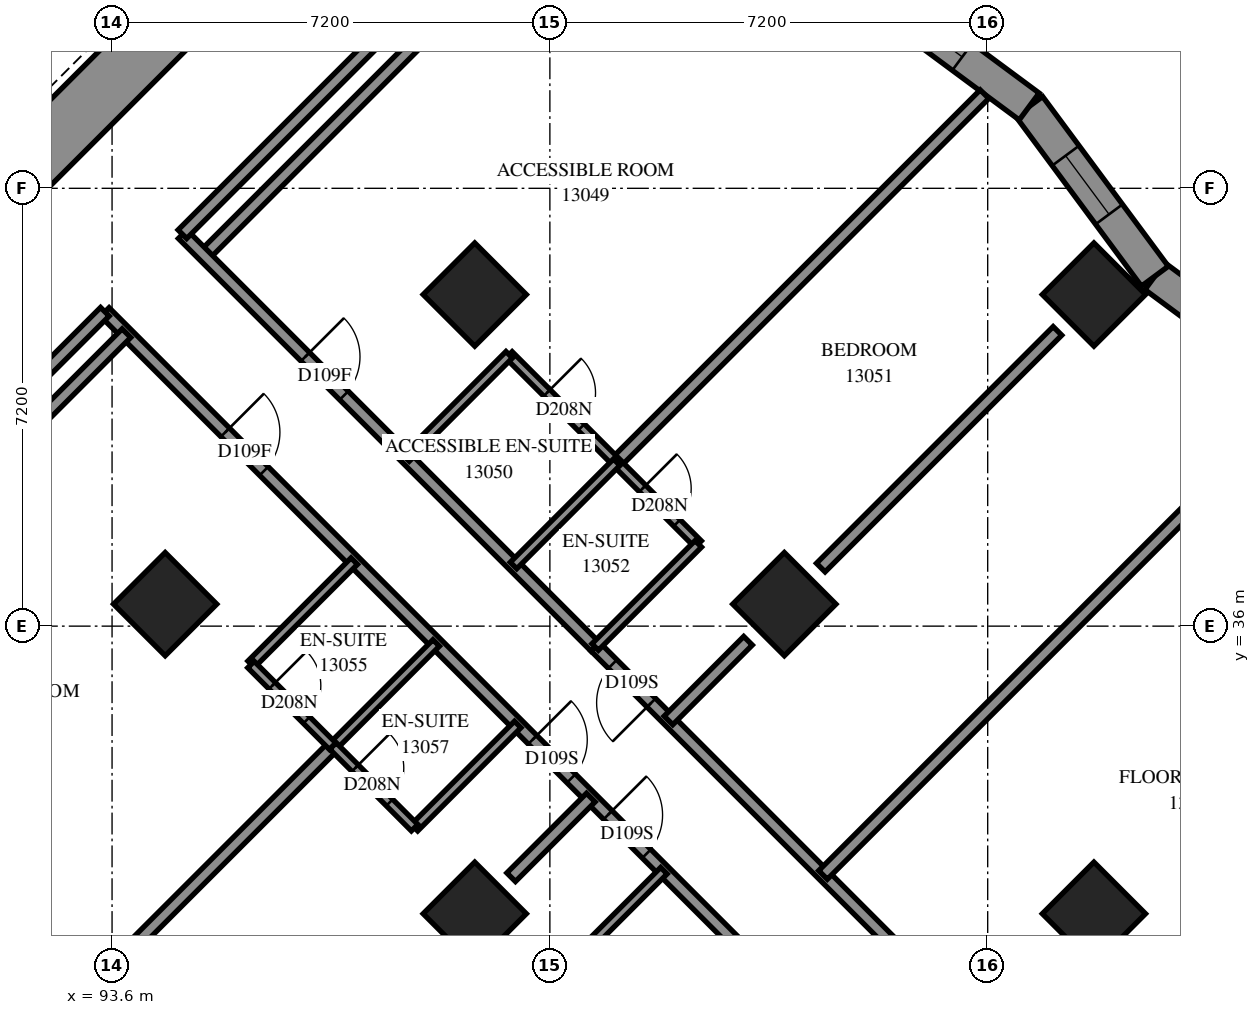
"""IFC4 building model, lengths in metres.
Left out: names, types, materials, properties, quantities, classifications, styles, units other than length and angle.
Written with IfcOpenShell. Run it as: python <this file> out.ifc"""

import sys

from ifc_helpers import new_model, si_unit, direction, frame, frame_2d, origin, origin_2d, place, context, subcontext, project, spatial, polyline, rectangle, outline, extrude, element, fill, save


model = new_model("IFC4")
c1 = context("Model", 3, precision=1e-05, world=origin(), true_north=direction((0.0, 1.0)))
c2 = subcontext(c1, "Body", "Model", "MODEL_VIEW")
j1 = project(units=[si_unit("LENGTHUNIT", "METRE"), si_unit("PLANEANGLEUNIT", "RADIAN")], contexts=[c1])
p1 = place(None, origin())
s1 = spatial("IfcSite", under=j1, at=p1, CompositionType="ELEMENT")
p2 = place(p1, origin())
s2 = spatial("IfcBuilding", under=s1, at=p2, CompositionType="ELEMENT")
p3 = place(p2, frame((0.0, 0.0, 50.8)))
s3 = spatial("IfcBuildingStorey", under=s2, at=p3, CompositionType="ELEMENT", Elevation=50.8)
for number, where, z_axis, x_axis in (
    (1, (99.565, 41.453, 0.0), (0.0, 0.0, 1.0), (0.707, -0.707, 0.0)),
    (2, (94.474, 36.362, 0.0), (0.0, 0.0, 1.0), (0.707, -0.707, 0.0)),
    (3, (109.747, 41.453, 0.0), (0.0, 0.0, 1.0), (0.707, -0.707, 0.0)),
    (4, (104.656, 36.362, 0.0), (0.0, 0.0, 1.0), (0.707, -0.707, 0.0)),
    (5, (99.565, 31.271, 0.0), (0.0, 0.0, 1.0), (0.707, -0.707, 0.0)),
    (6, (109.747, 31.271, 0.0), (0.0, 0.0, 1.0), (0.707, -0.707, 0.0)),
):
    element("IfcColumn", number, at=place(p3, frame(where, z_axis=z_axis, x_axis=x_axis)), inside=s3, PredefinedType="COLUMN", context=c2, shape_type="SweptSolid", body=[
        extrude(rectangle(XDim=1.2, YDim=1.2, at=origin_2d()), origin(), (0.0, 0.0, 1.0), 3.1),
    ])
p4 = place(p3, frame((87.19, 38.554, -0.3), z_axis=(0.0, 0.0, 1.0), x_axis=(0.707103309, 0.7071102534, 0.0)))
e7 = element("IfcWall", 7, at=p4, inside=s3, PredefinedType="SHEAR", context=c2, shape_type="SweptSolid", body=[
    extrude(rectangle(XDim=14.4, YDim=1.0, at=frame_2d((7.2, 0.0))), origin(), (0.0, 0.0, 1.0), 2.7),
])
p5 = place(p4, frame((4.55, 0.0, 0.3)))
e8 = element("IfcOpeningElement", 8, at=p5, cuts=e7, PredefinedType="OPENING", context=c2, shape_type="SweptSolid", body=[
    extrude(rectangle(XDim=1.1, YDim=2.1, at=frame_2d((0.55, 1.05))), frame((0.0, 0.51, 0.0), z_axis=(0.0, -1.0, 0.0), x_axis=(1.0, 0.0, 0.0)), (0.0, 0.0, 1.0), 1.02),
])
p6 = place(p4, frame((11.35, 0.0, 0.3)))
e9 = element("IfcOpeningElement", 9, at=p6, cuts=e7, PredefinedType="OPENING", context=c2, shape_type="SweptSolid", body=[
    extrude(rectangle(XDim=1.1, YDim=2.1, at=frame_2d((0.55, 1.05))), frame((0.0, 0.51, 0.0), z_axis=(0.0, -1.0, 0.0), x_axis=(1.0, 0.0, 0.0)), (0.0, 0.0, 1.0), 1.02),
])
p7 = place(p3, frame((113.54, 39.688, 0.0), z_axis=(0.0, 0.0, 1.0), x_axis=(-0.8036342136, 0.5951235593, 0.0)))
e10 = element("IfcWall", 10, at=p7, inside=s3, PredefinedType="SOLIDWALL", context=c2, shape_type="SweptSolid", body=[
    extrude(outline(polyline([(-0.041, -0.275), (3.432, -0.275), (3.514, 0.275), (0.041, 0.275), (-0.041, -0.275)])), origin(), (0.0, 0.0, 1.0), 3.1),
])
p8 = place(p7, frame((1.157, 0.0, 0.5)))
e11 = element("IfcOpeningElement", 11, at=p8, cuts=e10, PredefinedType="OPENING", context=c2, shape_type="SweptSolid", body=[
    extrude(rectangle(XDim=1.2, YDim=2.45, at=frame_2d((0.6, 1.225))), frame((0.0, 0.285, 0.0), z_axis=(0.0, -1.0, 0.0), x_axis=(1.0, 0.0, 0.0)), (0.0, 0.0, 1.0), 0.57),
])
p9 = place(p3, frame((110.749, 41.755, 0.0), z_axis=(0.0, 0.0, 1.0), x_axis=(-0.5951283843, 0.8036306404, 0.0)))
e12 = element("IfcWall", 12, at=p9, inside=s3, PredefinedType="SOLIDWALL", context=c2, shape_type="SweptSolid", body=[
    extrude(outline(polyline([(0.041, -0.275), (3.514, -0.275), (3.432, 0.275), (-0.041, 0.275), (0.041, -0.275)])), origin(), (0.0, 0.0, 1.0), 3.1),
])
p10 = place(p9, frame((1.266, 0.0, 0.5)))
e13 = element("IfcOpeningElement", 13, at=p10, cuts=e12, PredefinedType="OPENING", context=c2, shape_type="SweptSolid", body=[
    extrude(rectangle(XDim=1.2, YDim=2.45, at=frame_2d((0.6, 1.225))), frame((0.0, 0.285, 0.0), z_axis=(0.0, -1.0, 0.0), x_axis=(1.0, 0.0, 0.0)), (0.0, 0.0, 1.0), 0.57),
])
p11 = place(p3, frame((108.683, 44.545, 0.0), z_axis=(0.0, 0.0, 1.0), x_axis=(-0.8036342136, 0.5951235593, 0.0)))
e14 = element("IfcWall", 14, at=p11, inside=s3, PredefinedType="SOLIDWALL", context=c2, shape_type="SweptSolid", body=[
    extrude(outline(polyline([(-0.041, -0.275), (3.432, -0.275), (3.514, 0.275), (0.041, 0.275), (-0.041, -0.275)])), origin(), (0.0, 0.0, 1.0), 3.1),
])
p12 = place(p11, frame((1.37, 0.0, 0.5)))
e15 = element("IfcOpeningElement", 15, at=p12, cuts=e14, PredefinedType="OPENING", context=c2, shape_type="SweptSolid", body=[
    extrude(rectangle(XDim=1.2, YDim=2.45, at=frame_2d((0.6, 1.225))), frame((0.0, 0.285, 0.0), z_axis=(0.0, -1.0, 0.0), x_axis=(1.0, 0.0, 0.0)), (0.0, 0.0, 1.0), 0.57),
])
p13 = place(p3, frame((93.481, 41.167, 0.0), z_axis=(0.0, 0.0, 1.0), x_axis=(0.7071067812, -0.7071067812, 0.0)))
e16 = element("IfcWall", 16, at=p13, inside=s3, PredefinedType="PARTITIONING", context=c2, shape_type="SweptSolid", body=[
    extrude(rectangle(XDim=25.699, YDim=0.2, at=frame_2d((12.85, 0.0))), origin(), (0.0, 0.0, 1.0), 3.1),
])
p14 = place(p13, frame((2.8, 0.0, 0.0)))
e17 = element("IfcOpeningElement", 17, at=p14, cuts=e16, PredefinedType="OPENING", context=c2, shape_type="SweptSolid", body=[
    extrude(rectangle(XDim=0.9, YDim=2.1, at=frame_2d((0.45, 1.05))), frame((0.0, 0.11, 0.0), z_axis=(0.0, -1.0, 0.0), x_axis=(1.0, 0.0, 0.0)), (0.0, 0.0, 1.0), 0.22),
])
p15 = place(p13, frame((9.948, 0.0, 0.0)))
e18 = element("IfcOpeningElement", 18, at=p15, cuts=e16, PredefinedType="OPENING", context=c2, shape_type="SweptSolid", body=[
    extrude(rectangle(XDim=0.9, YDim=2.1, at=frame_2d((0.45, 1.05))), frame((0.0, 0.11, 0.0), z_axis=(0.0, -1.0, 0.0), x_axis=(1.0, 0.0, 0.0)), (0.0, 0.0, 1.0), 0.22),
])
p16 = place(p13, frame((11.7, 0.0, 0.0)))
e19 = element("IfcOpeningElement", 19, at=p16, cuts=e16, PredefinedType="OPENING", context=c2, shape_type="SweptSolid", body=[
    extrude(rectangle(XDim=0.9, YDim=2.1, at=frame_2d((0.45, 1.05))), frame((0.0, 0.11, 0.0), z_axis=(0.0, -1.0, 0.0), x_axis=(1.0, 0.0, 0.0)), (0.0, 0.0, 1.0), 0.22),
])
p17 = place(p13, frame((17.25, 0.0, 0.0)))
e20 = element("IfcOpeningElement", 20, at=p17, cuts=e16, PredefinedType="OPENING", context=c2, shape_type="SweptSolid", body=[
    extrude(rectangle(XDim=0.9, YDim=2.1, at=frame_2d((0.45, 1.05))), frame((0.0, 0.11, 0.0), z_axis=(0.0, -1.0, 0.0), x_axis=(1.0, 0.0, 0.0)), (0.0, 0.0, 1.0), 0.22),
])
p18 = place(p13, frame((22.82, 0.0, 0.0)))
e21 = element("IfcOpeningElement", 21, at=p18, cuts=e16, PredefinedType="OPENING", context=c2, shape_type="SweptSolid", body=[
    extrude(rectangle(XDim=0.9, YDim=2.1, at=frame_2d((0.45, 1.05))), frame((0.0, 0.11, 0.0), z_axis=(0.0, -1.0, 0.0), x_axis=(1.0, 0.0, 0.0)), (0.0, 0.0, 1.0), 0.22),
])
p19 = place(p3, frame((111.352, 25.855, 0.0), z_axis=(0.0, 0.0, 1.0), x_axis=(-0.7070418597, 0.7071716967, 0.0)))
e22 = element("IfcWall", 22, at=p19, inside=s3, PredefinedType="PARTITIONING", context=c2, shape_type="SweptSolid", body=[
    extrude(rectangle(XDim=13.864, YDim=0.2, at=frame_2d((6.932, 0.0))), origin(), (0.0, 0.0, 1.0), 3.1),
])
p20 = place(p19, frame((12.564, 0.0, 0.0)))
e23 = element("IfcOpeningElement", 23, at=p20, cuts=e22, PredefinedType="OPENING", context=c2, shape_type="SweptSolid", body=[
    extrude(rectangle(XDim=0.9, YDim=2.1, at=frame_2d((0.45, 1.05))), frame((0.0, 0.11, 0.0), z_axis=(0.0, -1.0, 0.0), x_axis=(1.0, 0.0, 0.0)), (0.0, 0.0, 1.0), 0.22),
])
p21 = place(p19, frame((5.19, 0.0, 0.0)))
e24 = element("IfcOpeningElement", 24, at=p21, cuts=e22, PredefinedType="OPENING", context=c2, shape_type="SweptSolid", body=[
    extrude(rectangle(XDim=1.0, YDim=2.1, at=frame_2d((0.5, 1.05))), frame((0.0, 0.11, 0.0), z_axis=(0.0, -1.0, 0.0), x_axis=(1.0, 0.0, 0.0)), (0.0, 0.0, 1.0), 0.22),
])
p22 = place(p3, frame((105.292, 31.908, 0.0), z_axis=(0.0, 0.0, 1.0), x_axis=(0.7071022382, 0.7071113241, 0.0)))
e25 = element("IfcWall", 25, at=p22, inside=s3, PredefinedType="PARTITIONING", context=c2, shape_type="SweptSolid", body=[
    extrude(rectangle(XDim=11.006, YDim=0.2, at=frame_2d((5.503, 0.0))), origin(), (0.0, 0.0, 1.0), 3.1),
])
p23 = place(p3, frame((95.109, 42.091, 0.0), z_axis=(0.0, 0.0, 1.0), x_axis=(0.7071113651, 0.7071021972, 0.0)))
e26 = element("IfcWall", 26, at=p23, inside=s3, PredefinedType="PARTITIONING", context=c2, shape_type="SweptSolid", body=[
    extrude(rectangle(XDim=10.908, YDim=0.2, at=frame_2d((5.454, 0.0))), origin(), (0.0, 0.0, 1.0), 3.1),
])
p24 = place(p3, frame((86.314, 33.295, 0.0), z_axis=(0.0, 0.0, 1.0), x_axis=(0.7071020809, 0.7071114814, 0.0)))
e27 = element("IfcWall", 27, at=p24, inside=s3, PredefinedType="PARTITIONING", context=c2, shape_type="SweptSolid", body=[
    extrude(rectangle(XDim=10.638, YDim=0.2, at=frame_2d((5.319, 0.0))), origin(), (0.0, 0.0, 1.0), 3.1),
])
p25 = place(p3, frame((94.761, 42.446, 0.0), z_axis=(0.0, 0.0, 1.0), x_axis=(0.7071067812, -0.7071067812, 0.0)))
e28 = element("IfcWall", 28, at=p25, inside=s3, PredefinedType="PARTITIONING", context=c2, shape_type="SweptSolid", body=[
    extrude(rectangle(XDim=9.597, YDim=0.2, at=frame_2d((4.798, 0.0))), origin(), (0.0, 0.0, 1.0), 3.1),
])
p26 = place(p25, frame((2.851, 0.0, 0.0)))
e29 = element("IfcOpeningElement", 29, at=p26, cuts=e28, PredefinedType="OPENING", context=c2, shape_type="SweptSolid", body=[
    extrude(rectangle(XDim=0.9, YDim=2.1, at=frame_2d((0.45, 1.05))), frame((0.0, 0.11, 0.0), z_axis=(0.0, -1.0, 0.0), x_axis=(1.0, 0.0, 0.0)), (0.0, 0.0, 1.0), 0.22),
])
for number, where, z_axis, x_axis in (
    (30, (86.836, 34.524, 0.0), (0.0, 0.0, 1.0), (0.707, 0.707, 0.0)),
    (31, (94.757, 42.445, 0.0), (0.0, 0.0, 1.0), (0.707, 0.707, 0.0)),
):
    element("IfcWall", number, at=place(p3, frame(where, z_axis=z_axis, x_axis=x_axis)), inside=s3, PredefinedType="PARTITIONING", context=c2, shape_type="SweptSolid", body=[
        extrude(rectangle(XDim=9.399, YDim=0.2, at=frame_2d((4.699, 0.0))), origin(), (0.0, 0.0, 1.0), 3.1),
    ])
p27 = place(p3, frame((101.896, 38.698, 0.0), z_axis=(0.0, 0.0, 1.0), x_axis=(0.7072294804, 0.7069840607, 0.0)))
e32 = element("IfcWall", 32, at=p27, inside=s3, PredefinedType="PARTITIONING", context=c2, shape_type="SweptSolid", body=[
    extrude(rectangle(XDim=8.557, YDim=0.2, at=frame_2d((4.278, 0.0))), origin(), (0.0, 0.0, 1.0), 3.1),
])
p28 = place(p3, frame((91.459, 28.251, 0.0), z_axis=(0.0, 0.0, 1.0), x_axis=(0.7072230972, 0.706990446, 0.0)))
e33 = element("IfcWall", 33, at=p28, inside=s3, PredefinedType="PARTITIONING", context=c2, shape_type="SweptSolid", body=[
    extrude(rectangle(XDim=8.167, YDim=0.2, at=frame_2d((4.083, 0.0))), origin(), (0.0, 0.0, 1.0), 3.1),
])
p29 = place(p3, frame((105.255, 36.963, 0.0), z_axis=(0.0, 0.0, 1.0), x_axis=(0.7071067812, 0.7071067812, 0.0)))
e34 = element("IfcWall", 34, at=p29, inside=s3, PredefinedType="PARTITIONING", context=c2, shape_type="SweptSolid", body=[
    extrude(rectangle(XDim=5.504, YDim=0.2, at=frame_2d((2.752, 0.0))), origin(), (0.0, 0.0, 1.0), 3.1),
])
p30 = place(p3, frame((100.126, 40.461, 0.0), z_axis=(0.0, 0.0, 1.0), x_axis=(0.7071067812, -0.7071067812, 0.0)))
e35 = element("IfcWall", 35, at=p30, inside=s3, PredefinedType="PARTITIONING", context=c2, shape_type="SweptSolid", body=[
    extrude(rectangle(XDim=4.401, YDim=0.15, at=frame_2d((2.2, 0.0))), origin(), (0.0, 0.0, 1.0), 3.1),
])
p31 = place(p30, frame((0.883, 0.0, 0.0)))
e36 = element("IfcOpeningElement", 36, at=p31, cuts=e35, PredefinedType="OPENING", context=c2, shape_type="SweptSolid", body=[
    extrude(rectangle(XDim=0.8, YDim=2.1, at=frame_2d((0.4, 1.05))), frame((0.0, 0.085, 0.0), z_axis=(0.0, -1.0, 0.0), x_axis=(1.0, 0.0, 0.0)), (0.0, 0.0, 1.0), 0.17),
])
p32 = place(p30, frame((3.108, 0.0, 0.0)))
e37 = element("IfcOpeningElement", 37, at=p32, cuts=e35, PredefinedType="OPENING", context=c2, shape_type="SweptSolid", body=[
    extrude(rectangle(XDim=0.8, YDim=2.1, at=frame_2d((0.4, 1.05))), frame((0.0, 0.085, 0.0), z_axis=(0.0, -1.0, 0.0), x_axis=(1.0, 0.0, 0.0)), (0.0, 0.0, 1.0), 0.17),
])
for number, where, z_axis, x_axis in (
    (38, (100.977, 30.281, 0.0), (0.0, 0.0, 1.0), (0.707, 0.707, 0.0)),
    (39, (98.573, 32.685, 0.0), (0.0, 0.0, 1.0), (0.707, 0.707, 0.0)),
):
    element("IfcWall", number, at=place(p3, frame(where, z_axis=z_axis, x_axis=x_axis)), inside=s3, PredefinedType="PARTITIONING", context=c2, shape_type="SweptSolid", body=[
        extrude(rectangle(XDim=2.401, YDim=0.15, at=frame_2d((1.201, 0.0))), origin(), (0.0, 0.0, 1.0), 3.1),
    ])
for number, where, z_axis, x_axis in (
    (40, (97.234, 34.026, 0.0), (0.0, 0.0, 1.0), (0.707, 0.708, 0.0)),
    (41, (98.435, 38.765, 0.0), (0.0, 0.0, 1.0), (0.707, 0.708, 0.0)),
    (42, (100.203, 36.997, 0.0), (0.0, 0.0, 1.0), (0.707, 0.708, 0.0)),
):
    element("IfcWall", number, at=place(p3, frame(where, z_axis=z_axis, x_axis=x_axis)), inside=s3, PredefinedType="PARTITIONING", context=c2, shape_type="SweptSolid", body=[
        extrude(rectangle(XDim=2.4, YDim=0.15, at=frame_2d((1.2, 0.0))), origin(), (0.0, 0.0, 1.0), 3.1),
    ])
for number, where, z_axis, x_axis in (
    (43, (95.887, 35.373, 0.0), (0.0, 0.0, 1.0), (0.707, 0.707, 0.0)),
    (44, (101.545, 35.657, 0.0), (0.0, 0.0, 1.0), (0.707, 0.707, 0.0)),
):
    element("IfcWall", number, at=place(p3, frame(where, z_axis=z_axis, x_axis=x_axis)), inside=s3, PredefinedType="PARTITIONING", context=c2, shape_type="SweptSolid", body=[
        extrude(rectangle(XDim=2.398, YDim=0.15, at=frame_2d((1.199, 0.0))), origin(), (0.0, 0.0, 1.0), 3.1),
    ])
p33 = place(p3, frame((95.885, 35.369, 0.0), z_axis=(0.0, 0.0, 1.0), x_axis=(0.7071067812, -0.7071067812, 0.0)))
e45 = element("IfcWall", 45, at=p33, inside=s3, PredefinedType="PARTITIONING", context=c2, shape_type="SweptSolid", body=[
    extrude(rectangle(XDim=1.901, YDim=0.15, at=frame_2d((0.95, 0.0))), origin(), (0.0, 0.0, 1.0), 3.1),
])
p34 = place(p33, frame((0.493, 0.0, 0.0)))
e46 = element("IfcOpeningElement", 46, at=p34, cuts=e45, PredefinedType="OPENING", context=c2, shape_type="SweptSolid", body=[
    extrude(rectangle(XDim=0.8, YDim=2.1, at=frame_2d((0.4, 1.05))), frame((0.0, 0.085, 0.0), z_axis=(0.0, -1.0, 0.0), x_axis=(1.0, 0.0, 0.0)), (0.0, 0.0, 1.0), 0.17),
])
p35 = place(p3, frame((97.233, 34.029, 0.0), z_axis=(0.0, 0.0, 1.0), x_axis=(0.7065800724, -0.7076330979, 0.0)))
e47 = element("IfcWall", 47, at=p35, inside=s3, PredefinedType="PARTITIONING", context=c2, shape_type="SweptSolid", body=[
    extrude(rectangle(XDim=1.899, YDim=0.15, at=frame_2d((0.95, 0.0))), origin(), (0.0, 0.0, 1.0), 3.1),
])
p36 = place(p35, frame((0.515, 0.0, 0.0)))
e48 = element("IfcOpeningElement", 48, at=p36, cuts=e47, PredefinedType="OPENING", context=c2, shape_type="SweptSolid", body=[
    extrude(rectangle(XDim=0.8, YDim=2.1, at=frame_2d((0.4, 1.05))), frame((0.0, 0.085, 0.0), z_axis=(0.0, -1.0, 0.0), x_axis=(1.0, 0.0, 0.0)), (0.0, 0.0, 1.0), 0.17),
])
p37 = place(p3, frame((100.163, 31.871, 0.0), z_axis=(0.0, 0.0, 1.0), x_axis=(0.7071067812, 0.7071067812, 0.0)))
e49 = element("IfcWall", 49, at=p37, inside=s3, PredefinedType="PARTITIONING", context=c2, shape_type="SweptSolid", body=[
    extrude(rectangle(XDim=1.853, YDim=0.2, at=frame_2d((0.926, 0.0))), origin(), (0.0, 0.0, 1.0), 3.1),
])
p38 = place(p3, frame((102.75, 34.45, 0.0), z_axis=(0.0, 0.0, 1.0), x_axis=(0.7065663865, 0.7076467632, 0.0)))
e50 = element("IfcWall", 50, at=p38, inside=s3, PredefinedType="PARTITIONING", context=c2, shape_type="SweptSolid", body=[
    extrude(rectangle(XDim=1.851, YDim=0.2, at=frame_2d((0.926, 0.0))), origin(), (0.0, 0.0, 1.0), 3.1),
])
p39 = place(p10, origin())
e51 = element("IfcWindow", 51, at=p39, inside=s3, PartitioningType="SINGLE_PANEL", PredefinedType="WINDOW", context=c2, shape_type="SweptSolid", body=[
    extrude(rectangle(XDim=1.2, YDim=2.45, at=frame_2d((0.6, 1.225))), frame((0.0, 0.155, 0.0), z_axis=(0.0, -1.0, 0.0), x_axis=(1.0, 0.0, 0.0)), (0.0, 0.0, 1.0), 0.06),
])
fill(e13, e51)
p40 = place(p12, origin())
e52 = element("IfcWindow", 52, at=p40, inside=s3, PartitioningType="SINGLE_PANEL", PredefinedType="WINDOW", context=c2, shape_type="SweptSolid", body=[
    extrude(rectangle(XDim=1.2, YDim=2.45, at=frame_2d((0.6, 1.225))), frame((0.0, 0.155, 0.0), z_axis=(0.0, -1.0, 0.0), x_axis=(1.0, 0.0, 0.0)), (0.0, 0.0, 1.0), 0.06),
])
fill(e15, e52)
p41 = place(p26, origin())
e53 = element("IfcDoor", 53, at=p41, inside=s3, OperationType="SINGLE_SWING_RIGHT", PredefinedType="DOOR", context=c2, shape_type="SweptSolid", body=[
    extrude(rectangle(XDim=0.9, YDim=2.1, at=frame_2d((0.45, 1.05))), frame((0.0, 0.025, 0.0), z_axis=(0.0, -1.0, 0.0), x_axis=(1.0, 0.0, 0.0)), (0.0, 0.0, 1.0), 0.05),
])
fill(e29, e53)
p42 = place(p31, origin())
e54 = element("IfcDoor", 54, at=p42, inside=s3, OperationType="SINGLE_SWING_RIGHT", PredefinedType="DOOR", context=c2, shape_type="SweptSolid", body=[
    extrude(rectangle(XDim=0.8, YDim=2.1, at=frame_2d((0.4, 1.05))), frame((0.0, 0.025, 0.0), z_axis=(0.0, -1.0, 0.0), x_axis=(1.0, 0.0, 0.0)), (0.0, 0.0, 1.0), 0.05),
])
fill(e36, e54)
p43 = place(p20, origin())
e55 = element("IfcDoor", 55, at=p43, inside=s3, OperationType="SINGLE_SWING_RIGHT", PredefinedType="DOOR", context=c2, shape_type="SweptSolid", body=[
    extrude(rectangle(XDim=0.9, YDim=2.1, at=frame_2d((0.45, 1.05))), frame((0.0, 0.025, 0.0), z_axis=(0.0, -1.0, 0.0), x_axis=(1.0, 0.0, 0.0)), (0.0, 0.0, 1.0), 0.05),
])
fill(e23, e55)
p44 = place(p32, origin())
e56 = element("IfcDoor", 56, at=p44, inside=s3, OperationType="SINGLE_SWING_RIGHT", PredefinedType="DOOR", context=c2, shape_type="SweptSolid", body=[
    extrude(rectangle(XDim=0.8, YDim=2.1, at=frame_2d((0.4, 1.05))), frame((0.0, 0.025, 0.0), z_axis=(0.0, -1.0, 0.0), x_axis=(1.0, 0.0, 0.0)), (0.0, 0.0, 1.0), 0.05),
])
fill(e37, e56)
p45 = place(p14, origin())
e57 = element("IfcDoor", 57, at=p45, inside=s3, OperationType="SINGLE_SWING_LEFT", PredefinedType="DOOR", context=c2, shape_type="SweptSolid", body=[
    extrude(rectangle(XDim=0.9, YDim=2.1, at=frame_2d((0.45, 1.05))), frame((0.0, 0.025, 0.0), z_axis=(0.0, -1.0, 0.0), x_axis=(1.0, 0.0, 0.0)), (0.0, 0.0, 1.0), 0.05),
])
fill(e17, e57)
p46 = place(p34, origin())
e58 = element("IfcDoor", 58, at=p46, inside=s3, OperationType="SINGLE_SWING_RIGHT", PredefinedType="DOOR", context=c2, shape_type="SweptSolid", body=[
    extrude(rectangle(XDim=0.8, YDim=2.1, at=frame_2d((0.4, 1.05))), frame((0.0, 0.025, 0.0), z_axis=(0.0, -1.0, 0.0), x_axis=(1.0, 0.0, 0.0)), (0.0, 0.0, 1.0), 0.05),
])
fill(e46, e58)
p47 = place(p15, origin())
e59 = element("IfcDoor", 59, at=p47, inside=s3, OperationType="SINGLE_SWING_LEFT", PredefinedType="DOOR", context=c2, shape_type="SweptSolid", body=[
    extrude(rectangle(XDim=0.9, YDim=2.1, at=frame_2d((0.45, 1.05))), frame((0.0, 0.025, 0.0), z_axis=(0.0, -1.0, 0.0), x_axis=(1.0, 0.0, 0.0)), (0.0, 0.0, 1.0), 0.05),
])
fill(e18, e59)
p48 = place(p36, origin())
e60 = element("IfcDoor", 60, at=p48, inside=s3, OperationType="SINGLE_SWING_RIGHT", PredefinedType="DOOR", context=c2, shape_type="SweptSolid", body=[
    extrude(rectangle(XDim=0.8, YDim=2.1, at=frame_2d((0.4, 1.05))), frame((0.0, 0.025, 0.0), z_axis=(0.0, -1.0, 0.0), x_axis=(1.0, 0.0, 0.0)), (0.0, 0.0, 1.0), 0.05),
])
fill(e48, e60)
p49 = place(p16, origin())
e61 = element("IfcDoor", 61, at=p49, inside=s3, OperationType="SINGLE_SWING_RIGHT", PredefinedType="DOOR", context=c2, shape_type="SweptSolid", body=[
    extrude(rectangle(XDim=0.9, YDim=2.1, at=frame_2d((0.45, 1.05))), frame((0.0, 0.025, 0.0), z_axis=(0.0, -1.0, 0.0), x_axis=(1.0, 0.0, 0.0)), (0.0, 0.0, 1.0), 0.05),
])
fill(e19, e61)
save(model, sys.argv[1])
